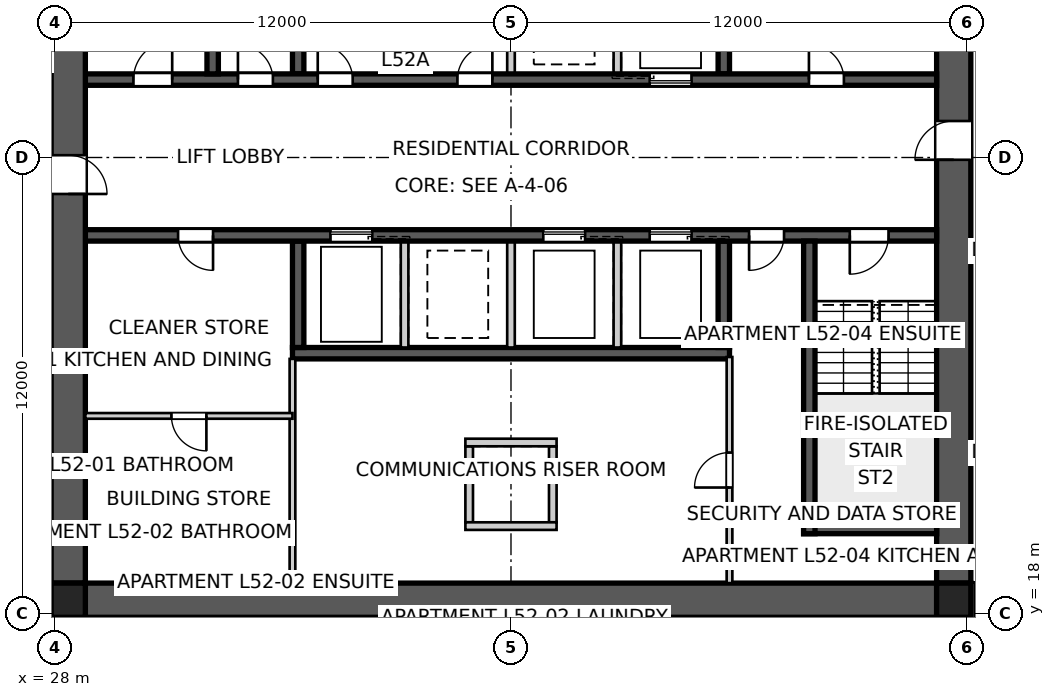
"""IFC4 building model, lengths in metres.
Left out: names, types, materials, properties, quantities, classifications, styles, units other than length and angle.
Written with IfcOpenShell. Run it as: python <this file> out.ifc"""

import sys

from ifc_helpers import new_model, si_unit, direction, frame, frame_2d, origin, origin_2d, place, context, subcontext, project, spatial, polyline, rectangle, outline, extrude, element, fill, save


model = new_model("IFC4")
c1 = context("Model", 3, precision=1e-05, world=origin(), true_north=direction((0.0, 1.0)))
c2 = subcontext(c1, "Body", "Model", "MODEL_VIEW")
j1 = project(units=[si_unit("LENGTHUNIT", "METRE"), si_unit("PLANEANGLEUNIT", "RADIAN")], contexts=[c1])
p1 = place(None, origin())
s1 = spatial("IfcSite", under=j1, at=p1, CompositionType="ELEMENT")
p2 = place(p1, origin())
s2 = spatial("IfcBuilding", under=s1, at=p2, CompositionType="ELEMENT")
p3 = place(p2, frame((0.0, 0.0, 189.6)))
s3 = spatial("IfcBuildingStorey", under=s2, at=p3, CompositionType="ELEMENT", Elevation=189.6)
p4 = place(p3, frame((51.2, 18.35, 0.0), z_axis=(0.0, 0.0, 1.0), x_axis=(-1.0, 0.0, 0.0)))
e1 = element("IfcWall", 1, at=p4, inside=s3, PredefinedType="SHEAR", context=c2, shape_type="SweptSolid", body=[
    extrude(outline(polyline([(0.0, -0.45), (22.4, -0.45), (22.4, -0.025), (22.85, -0.025), (22.85, 0.025), (22.4, 0.025), (22.4, 0.45), (0.0, 0.45), (0.0, 0.025), (-0.45, 0.025), (-0.45, -0.025), (0.0, -0.025), (0.0, -0.45)])), origin(), (0.0, 0.0, 1.0), 3.4),
])
p5 = place(p3, frame((51.65, 18.8, 0.0), z_axis=(0.0, 0.0, 1.0), x_axis=(0.0, 1.0, 0.0)))
e2 = element("IfcWall", 2, at=p5, inside=s3, PredefinedType="SHEAR", context=c2, shape_type="SweptSolid", body=[
    extrude(outline(polyline([(0.0, -0.45), (22.4, -0.45), (22.4, -0.025), (22.85, -0.025), (22.85, 0.025), (22.4, 0.025), (22.4, 0.45), (0.0, 0.45), (0.0, 0.025), (-0.45, 0.025), (-0.45, -0.025), (0.0, -0.025), (0.0, -0.45)])), origin(), (0.0, 0.0, 1.0), 3.4),
])
p6 = place(p5, frame((11.14, 0.0, 0.0)))
e3 = element("IfcOpeningElement", 3, at=p6, cuts=e2, PredefinedType="OPENING", context=c2, shape_type="SweptSolid", body=[
    extrude(rectangle(XDim=1.02, YDim=2.4, at=frame_2d((0.51, 1.2))), frame((0.0, 0.46, 0.0), z_axis=(0.0, -1.0, 0.0), x_axis=(1.0, 0.0, 0.0)), (0.0, 0.0, 1.0), 0.92),
])
p7 = place(p3, frame((28.35, 41.2, 0.0), z_axis=(0.0, 0.0, 1.0), x_axis=(0.0, -1.0, 0.0)))
e4 = element("IfcWall", 4, at=p7, inside=s3, PredefinedType="SHEAR", context=c2, shape_type="SweptSolid", body=[
    extrude(outline(polyline([(0.0, -0.45), (22.4, -0.45), (22.4, -0.025), (22.85, -0.025), (22.85, 0.025), (22.4, 0.025), (22.4, 0.45), (0.0, 0.45), (0.0, 0.025), (-0.45, 0.025), (-0.45, -0.025), (0.0, -0.025), (0.0, -0.45)])), origin(), (0.0, 0.0, 1.0), 3.4),
])
p8 = place(p7, frame((11.14, 0.0, 0.0)))
e5 = element("IfcOpeningElement", 5, at=p8, cuts=e4, PredefinedType="OPENING", context=c2, shape_type="SweptSolid", body=[
    extrude(rectangle(XDim=1.02, YDim=2.4, at=frame_2d((0.51, 1.2))), frame((0.0, 0.46, 0.0), z_axis=(0.0, -1.0, 0.0), x_axis=(1.0, 0.0, 0.0)), (0.0, 0.0, 1.0), 0.92),
])
p9 = place(p3, frame((28.8, 32.05, 0.0), z_axis=(0.0, 0.0, 1.0), x_axis=(1.0, 0.0, 0.0)))
e6 = element("IfcWall", 6, at=p9, inside=s3, PredefinedType="SHEAR", context=c2, shape_type="SweptSolid", body=[
    extrude(rectangle(XDim=22.4, YDim=0.3, at=frame_2d((11.2, 0.0))), origin(), (0.0, 0.0, 1.0), 3.4),
])
p10 = place(p9, frame((19.04, 0.0, 0.0)))
e7 = element("IfcOpeningElement", 7, at=p10, cuts=e6, PredefinedType="OPENING", context=c2, shape_type="SweptSolid", body=[
    extrude(rectangle(XDim=0.92, YDim=2.1, at=frame_2d((0.46, 1.05))), frame((0.0, 0.16, 0.0), z_axis=(0.0, -1.0, 0.0), x_axis=(1.0, 0.0, 0.0)), (0.0, 0.0, 1.0), 0.32),
])
p11 = place(p9, frame((1.265, 0.0, 0.0)))
e8 = element("IfcOpeningElement", 8, at=p11, cuts=e6, PredefinedType="OPENING", context=c2, shape_type="SweptSolid", body=[
    extrude(rectangle(XDim=1.02, YDim=2.1, at=frame_2d((0.51, 1.05))), frame((0.0, 0.16, 0.0), z_axis=(0.0, -1.0, 0.0), x_axis=(1.0, 0.0, 0.0)), (0.0, 0.0, 1.0), 0.32),
])
p12 = place(p9, frame((4.015, 0.0, 0.0)))
e9 = element("IfcOpeningElement", 9, at=p12, cuts=e6, PredefinedType="OPENING", context=c2, shape_type="SweptSolid", body=[
    extrude(rectangle(XDim=0.92, YDim=2.1, at=frame_2d((0.46, 1.05))), frame((0.0, 0.16, 0.0), z_axis=(0.0, -1.0, 0.0), x_axis=(1.0, 0.0, 0.0)), (0.0, 0.0, 1.0), 0.32),
])
p13 = place(p9, frame((6.115, 0.0, 0.0)))
e10 = element("IfcOpeningElement", 10, at=p13, cuts=e6, PredefinedType="OPENING", context=c2, shape_type="SweptSolid", body=[
    extrude(rectangle(XDim=0.92, YDim=2.1, at=frame_2d((0.46, 1.05))), frame((0.0, 0.16, 0.0), z_axis=(0.0, -1.0, 0.0), x_axis=(1.0, 0.0, 0.0)), (0.0, 0.0, 1.0), 0.32),
])
p14 = place(p9, frame((9.79, 0.0, 0.0)))
e11 = element("IfcOpeningElement", 11, at=p14, cuts=e6, PredefinedType="OPENING", context=c2, shape_type="SweptSolid", body=[
    extrude(rectangle(XDim=0.92, YDim=2.1, at=frame_2d((0.46, 1.05))), frame((0.0, 0.16, 0.0), z_axis=(0.0, -1.0, 0.0), x_axis=(1.0, 0.0, 0.0)), (0.0, 0.0, 1.0), 0.32),
])
p15 = place(p9, frame((14.85, 0.0, 0.0)))
e12 = element("IfcOpeningElement", 12, at=p15, cuts=e6, PredefinedType="OPENING", context=c2, shape_type="SweptSolid", body=[
    extrude(rectangle(XDim=1.1, YDim=2.1, at=frame_2d((0.55, 1.05))), frame((0.0, 0.16, 0.0), z_axis=(0.0, -1.0, 0.0), x_axis=(1.0, 0.0, 0.0)), (0.0, 0.0, 1.0), 0.32),
])
p16 = place(p3, frame((51.2, 27.95, 0.0), z_axis=(0.0, 0.0, 1.0), x_axis=(-1.0, 0.0, 0.0)))
e13 = element("IfcWall", 13, at=p16, inside=s3, PredefinedType="SHEAR", context=c2, shape_type="SweptSolid", body=[
    extrude(rectangle(XDim=22.4, YDim=0.3, at=frame_2d((11.2, 0.0))), origin(), (0.0, 0.0, 1.0), 3.4),
])
p17 = place(p16, frame((19.04, 0.0, 0.0)))
e14 = element("IfcOpeningElement", 14, at=p17, cuts=e13, PredefinedType="OPENING", context=c2, shape_type="SweptSolid", body=[
    extrude(rectangle(XDim=0.92, YDim=2.1, at=frame_2d((0.46, 1.05))), frame((0.0, 0.16, 0.0), z_axis=(0.0, -1.0, 0.0), x_axis=(1.0, 0.0, 0.0)), (0.0, 0.0, 1.0), 0.32),
])
p18 = place(p16, frame((1.265, 0.0, 0.0)))
e15 = element("IfcOpeningElement", 15, at=p18, cuts=e13, PredefinedType="OPENING", context=c2, shape_type="SweptSolid", body=[
    extrude(rectangle(XDim=1.02, YDim=2.1, at=frame_2d((0.51, 1.05))), frame((0.0, 0.16, 0.0), z_axis=(0.0, -1.0, 0.0), x_axis=(1.0, 0.0, 0.0)), (0.0, 0.0, 1.0), 0.32),
])
p19 = place(p16, frame((4.015, 0.0, 0.0)))
e16 = element("IfcOpeningElement", 16, at=p19, cuts=e13, PredefinedType="OPENING", context=c2, shape_type="SweptSolid", body=[
    extrude(rectangle(XDim=0.92, YDim=2.1, at=frame_2d((0.46, 1.05))), frame((0.0, 0.16, 0.0), z_axis=(0.0, -1.0, 0.0), x_axis=(1.0, 0.0, 0.0)), (0.0, 0.0, 1.0), 0.32),
])
p20 = place(p16, frame((6.45, 0.0, 0.0)))
e17 = element("IfcOpeningElement", 17, at=p20, cuts=e13, PredefinedType="OPENING", context=c2, shape_type="SweptSolid", body=[
    extrude(rectangle(XDim=1.1, YDim=2.1, at=frame_2d((0.55, 1.05))), frame((0.0, 0.16, 0.0), z_axis=(0.0, -1.0, 0.0), x_axis=(1.0, 0.0, 0.0)), (0.0, 0.0, 1.0), 0.32),
])
p21 = place(p16, frame((9.25, 0.0, 0.0)))
e18 = element("IfcOpeningElement", 18, at=p21, cuts=e13, PredefinedType="OPENING", context=c2, shape_type="SweptSolid", body=[
    extrude(rectangle(XDim=1.1, YDim=2.1, at=frame_2d((0.55, 1.05))), frame((0.0, 0.16, 0.0), z_axis=(0.0, -1.0, 0.0), x_axis=(1.0, 0.0, 0.0)), (0.0, 0.0, 1.0), 0.32),
])
p22 = place(p16, frame((14.85, 0.0, 0.0)))
e19 = element("IfcOpeningElement", 19, at=p22, cuts=e13, PredefinedType="OPENING", context=c2, shape_type="SweptSolid", body=[
    extrude(rectangle(XDim=1.1, YDim=2.1, at=frame_2d((0.55, 1.05))), frame((0.0, 0.16, 0.0), z_axis=(0.0, -1.0, 0.0), x_axis=(1.0, 0.0, 0.0)), (0.0, 0.0, 1.0), 0.32),
])
p23 = place(p3, frame((45.75, 24.85, 0.0), z_axis=(0.0, 0.0, 1.0), x_axis=(-1.0, 0.0, 0.0)))
e20 = element("IfcWall", 20, at=p23, inside=s3, PredefinedType="SHEAR", context=c2, shape_type="SweptSolid", body=[
    extrude(rectangle(XDim=11.5, YDim=0.3, at=frame_2d((5.75, 0.0))), origin(), (0.0, 0.0, 1.0), 3.4),
])
for number, where, z_axis, x_axis in (
    (21, (34.4, 32.2, 0.0), (0.0, 0.0, 1.0), (0.0, 1.0, 0.0)),
    (22, (45.6, 27.8, 0.0), (0.0, 0.0, 1.0), (0.0, -1.0, 0.0)),
):
    element("IfcWall", number, at=place(p3, frame(where, z_axis=z_axis, x_axis=x_axis)), inside=s3, PredefinedType="SHEAR", context=c2, shape_type="SweptSolid", body=[
        extrude(rectangle(XDim=2.8, YDim=0.3, at=frame_2d((1.4, 0.0))), origin(), (0.0, 0.0, 1.0), 3.4),
    ])
for number, where, z_axis, x_axis in (
    (23, (42.8, 27.8, 0.0), (0.0, 0.0, 1.0), (0.0, -1.0, 0.0)),
    (24, (40.0, 32.2, 0.0), (0.0, 0.0, 1.0), (0.0, 1.0, 0.0)),
    (25, (40.0, 27.8, 0.0), (0.0, 0.0, 1.0), (0.0, -1.0, 0.0)),
    (26, (42.8, 32.2, 0.0), (0.0, 0.0, 1.0), (0.0, 1.0, 0.0)),
    (27, (37.2, 27.8, 0.0), (0.0, 0.0, 1.0), (0.0, -1.0, 0.0)),
):
    element("IfcWall", number, at=place(p3, frame(where, z_axis=z_axis, x_axis=x_axis)), inside=s3, PredefinedType="SOLIDWALL", context=c2, shape_type="SweptSolid", body=[
        extrude(rectangle(XDim=2.8, YDim=0.2, at=frame_2d((1.4, 0.0))), origin(), (0.0, 0.0, 1.0), 3.4),
    ])
for number, where, z_axis, x_axis in (
    (28, (45.6, 32.2, 0.0), (0.0, 0.0, 1.0), (0.0, 1.0, 0.0)),
    (29, (34.4, 27.8, 0.0), (0.0, 0.0, 1.0), (0.0, -1.0, 0.0)),
):
    element("IfcWall", number, at=place(p3, frame(where, z_axis=z_axis, x_axis=x_axis)), inside=s3, PredefinedType="SHEAR", context=c2, shape_type="SweptSolid", body=[
        extrude(rectangle(XDim=2.8, YDim=0.3, at=frame_2d((1.4, 0.0))), origin(), (0.0, 0.0, 1.0), 3.4),
    ])
for number, where, z_axis, x_axis in (
    (30, (32.15, 32.2, 0.0), (0.0, 0.0, 1.0), (0.0, 1.0, 0.0)),
    (31, (47.85, 27.8, 0.0), (0.0, 0.0, 1.0), (0.0, -1.0, 0.0)),
):
    element("IfcWall", number, at=place(p3, frame(where, z_axis=z_axis, x_axis=x_axis)), inside=s3, PredefinedType="SHEAR", context=c2, shape_type="SweptSolid", body=[
        extrude(rectangle(XDim=7.7, YDim=0.3, at=frame_2d((3.85, 0.0))), origin(), (0.0, 0.0, 1.0), 3.4),
    ])
p24 = place(p3, frame((51.2, 20.25, 0.0), z_axis=(0.0, 0.0, 1.0), x_axis=(-1.0, 0.0, 0.0)))
e32 = element("IfcWall", 32, at=p24, inside=s3, PredefinedType="SHEAR", context=c2, shape_type="SweptSolid", body=[
    extrude(rectangle(XDim=3.5, YDim=0.3, at=frame_2d((1.75, 0.0))), origin(), (0.0, 0.0, 1.0), 3.4),
])
for number, where, z_axis, x_axis in (
    (33, (38.9, 22.4, 0.0), (0.0, 0.0, 1.0), (0.0, -1.0, 0.0)),
    (34, (41.1, 22.4, 0.0), (0.0, 0.0, 1.0), (0.0, -1.0, 0.0)),
):
    element("IfcWall", number, at=place(p3, frame(where, z_axis=z_axis, x_axis=x_axis)), inside=s3, PredefinedType="SOLIDWALL", context=c2, shape_type="SweptSolid", body=[
        extrude(rectangle(XDim=2.0, YDim=0.2, at=frame_2d((1.0, 0.0))), origin(), (0.0, 0.0, 1.0), 3.4),
    ])
for number, where, z_axis, x_axis in (
    (35, (38.8, 22.5, 0.0), (0.0, 0.0, 1.0), (1.0, 0.0, 0.0)),
    (36, (38.8, 20.3, 0.0), (0.0, 0.0, 1.0), (1.0, 0.0, 0.0)),
):
    element("IfcWall", number, at=place(p3, frame(where, z_axis=z_axis, x_axis=x_axis)), inside=s3, PredefinedType="SOLIDWALL", context=c2, shape_type="SweptSolid", body=[
        extrude(rectangle(XDim=2.4, YDim=0.2, at=frame_2d((1.2, 0.0))), origin(), (0.0, 0.0, 1.0), 3.4),
    ])
for number, where, z_axis, x_axis in (
    (37, (28.35, 18.35, 0.0), (0.0, 0.0, 1.0), (1.0, 0.0, 0.0)),
    (38, (51.65, 18.35, 0.0), (0.0, 0.0, 1.0), (1.0, 0.0, 0.0)),
):
    element("IfcColumn", number, at=place(p3, frame(where, z_axis=z_axis, x_axis=x_axis)), inside=s3, PredefinedType="COLUMN", context=c2, shape_type="SweptSolid", body=[
        extrude(rectangle(XDim=0.9, YDim=0.9, at=origin_2d()), origin(), (0.0, 0.0, 1.0), 3.4),
    ])
p25 = place(p3, frame((45.75, 18.8, 0.0), z_axis=(0.0, 0.0, 1.0), x_axis=(0.0, 1.0, 0.0)))
e39 = element("IfcWall", 39, at=p25, inside=s3, PredefinedType="SOLIDWALL", context=c2, shape_type="SweptSolid", body=[
    extrude(rectangle(XDim=5.95, YDim=0.15, at=frame_2d((2.975, 0.0))), origin(), (0.0, 0.0, 1.0), 3.25),
])
p26 = place(p25, frame((2.515, 0.0, 0.0)))
e40 = element("IfcOpeningElement", 40, at=p26, cuts=e39, PredefinedType="OPENING", context=c2, shape_type="SweptSolid", body=[
    extrude(rectangle(XDim=0.92, YDim=2.1, at=frame_2d((0.46, 1.05))), frame((0.0, 0.085, 0.0), z_axis=(0.0, -1.0, 0.0), x_axis=(1.0, 0.0, 0.0)), (0.0, 0.0, 1.0), 0.17),
])
p27 = place(p3, frame((34.25, 18.8, 0.0), z_axis=(0.0, 0.0, 1.0), x_axis=(0.0, 1.0, 0.0)))
e41 = element("IfcWall", 41, at=p27, inside=s3, PredefinedType="SOLIDWALL", context=c2, shape_type="SweptSolid", body=[
    extrude(rectangle(XDim=5.9, YDim=0.15, at=frame_2d((2.95, 0.0))), origin(), (0.0, 0.0, 1.0), 3.25),
])
p28 = place(p3, frame((34.25, 23.2, 0.0), z_axis=(0.0, 0.0, 1.0), x_axis=(-1.0, 0.0, 0.0)))
e42 = element("IfcWall", 42, at=p28, inside=s3, PredefinedType="SOLIDWALL", context=c2, shape_type="SweptSolid", body=[
    extrude(rectangle(XDim=5.45, YDim=0.15, at=frame_2d((2.725, 0.0))), origin(), (0.0, 0.0, 1.0), 3.25),
])
p29 = place(p28, frame((2.265, 0.0, 0.0)))
e43 = element("IfcOpeningElement", 43, at=p29, cuts=e42, PredefinedType="OPENING", context=c2, shape_type="SweptSolid", body=[
    extrude(rectangle(XDim=0.92, YDim=2.1, at=frame_2d((0.46, 1.05))), frame((0.0, 0.085, 0.0), z_axis=(0.0, -1.0, 0.0), x_axis=(1.0, 0.0, 0.0)), (0.0, 0.0, 1.0), 0.17),
])
p30 = place(p3, frame((27.9, 17.95, 0.0), z_axis=(0.0, 0.0, 1.0), x_axis=(0.0, -1.0, 0.0)))
e44 = element("IfcWall", 44, at=p30, inside=s3, PredefinedType="PARTITIONING", context=c2, shape_type="SweptSolid", body=[
    extrude(rectangle(XDim=2.3, YDim=0.2, at=frame_2d((1.15, 0.0))), origin(), (0.0, 0.0, 1.0), 3.25),
])
p31 = place(p3, frame((52.1, 15.65, 0.0), z_axis=(0.0, 0.0, 1.0), x_axis=(0.0, 1.0, 0.0)))
e45 = element("IfcWall", 45, at=p31, inside=s3, PredefinedType="PARTITIONING", context=c2, shape_type="SweptSolid", body=[
    extrude(rectangle(XDim=3.17, YDim=0.2, at=frame_2d((1.585, 0.0))), origin(), (0.0, 0.0, 1.0), 3.25),
])
p32 = place(p10, origin())
e46 = element("IfcDoor", 46, at=p32, inside=s3, OperationType="SINGLE_SWING_LEFT", PredefinedType="DOOR", context=c2, shape_type="SweptSolid", body=[
    extrude(rectangle(XDim=0.92, YDim=2.1, at=frame_2d((0.46, 1.05))), frame((0.0, 0.025, 0.0), z_axis=(0.0, -1.0, 0.0), x_axis=(1.0, 0.0, 0.0)), (0.0, 0.0, 1.0), 0.05),
])
fill(e7, e46)
p33 = place(p17, origin())
e47 = element("IfcDoor", 47, at=p33, inside=s3, OperationType="SINGLE_SWING_LEFT", PredefinedType="DOOR", context=c2, shape_type="SweptSolid", body=[
    extrude(rectangle(XDim=0.92, YDim=2.1, at=frame_2d((0.46, 1.05))), frame((0.0, 0.025, 0.0), z_axis=(0.0, -1.0, 0.0), x_axis=(1.0, 0.0, 0.0)), (0.0, 0.0, 1.0), 0.05),
])
fill(e14, e47)
p34 = place(p18, origin())
e48 = element("IfcDoor", 48, at=p34, inside=s3, OperationType="SINGLE_SWING_RIGHT", PredefinedType="DOOR", context=c2, shape_type="SweptSolid", body=[
    extrude(rectangle(XDim=1.02, YDim=2.1, at=frame_2d((0.51, 1.05))), frame((0.0, 0.025, 0.0), z_axis=(0.0, -1.0, 0.0), x_axis=(1.0, 0.0, 0.0)), (0.0, 0.0, 1.0), 0.05),
])
fill(e15, e48)
p35 = place(p11, origin())
e49 = element("IfcDoor", 49, at=p35, inside=s3, OperationType="SINGLE_SWING_RIGHT", PredefinedType="DOOR", context=c2, shape_type="SweptSolid", body=[
    extrude(rectangle(XDim=1.02, YDim=2.1, at=frame_2d((0.51, 1.05))), frame((0.0, 0.025, 0.0), z_axis=(0.0, -1.0, 0.0), x_axis=(1.0, 0.0, 0.0)), (0.0, 0.0, 1.0), 0.05),
])
fill(e8, e49)
p36 = place(p12, origin())
e50 = element("IfcDoor", 50, at=p36, inside=s3, OperationType="SINGLE_SWING_LEFT", PredefinedType="DOOR", context=c2, shape_type="SweptSolid", body=[
    extrude(rectangle(XDim=0.92, YDim=2.1, at=frame_2d((0.46, 1.05))), frame((0.0, 0.025, 0.0), z_axis=(0.0, -1.0, 0.0), x_axis=(1.0, 0.0, 0.0)), (0.0, 0.0, 1.0), 0.05),
])
fill(e9, e50)
p37 = place(p19, origin())
e51 = element("IfcDoor", 51, at=p37, inside=s3, OperationType="SINGLE_SWING_RIGHT", PredefinedType="DOOR", context=c2, shape_type="SweptSolid", body=[
    extrude(rectangle(XDim=0.92, YDim=2.1, at=frame_2d((0.46, 1.05))), frame((0.0, 0.025, 0.0), z_axis=(0.0, -1.0, 0.0), x_axis=(1.0, 0.0, 0.0)), (0.0, 0.0, 1.0), 0.05),
])
fill(e16, e51)
p38 = place(p29, origin())
e52 = element("IfcDoor", 52, at=p38, inside=s3, OperationType="SINGLE_SWING_LEFT", PredefinedType="DOOR", context=c2, shape_type="SweptSolid", body=[
    extrude(rectangle(XDim=0.92, YDim=2.1, at=frame_2d((0.46, 1.05))), frame((0.0, 0.025, 0.0), z_axis=(0.0, -1.0, 0.0), x_axis=(1.0, 0.0, 0.0)), (0.0, 0.0, 1.0), 0.05),
])
fill(e43, e52)
p39 = place(p26, origin())
e53 = element("IfcDoor", 53, at=p39, inside=s3, OperationType="SINGLE_SWING_LEFT", PredefinedType="DOOR", context=c2, shape_type="SweptSolid", body=[
    extrude(rectangle(XDim=0.92, YDim=2.1, at=frame_2d((0.46, 1.05))), frame((0.0, 0.025, 0.0), z_axis=(0.0, -1.0, 0.0), x_axis=(1.0, 0.0, 0.0)), (0.0, 0.0, 1.0), 0.05),
])
fill(e40, e53)
p40 = place(p13, origin())
e54 = element("IfcDoor", 54, at=p40, inside=s3, OperationType="SINGLE_SWING_LEFT", PredefinedType="DOOR", context=c2, shape_type="SweptSolid", body=[
    extrude(rectangle(XDim=0.92, YDim=2.1, at=frame_2d((0.46, 1.05))), frame((0.0, 0.025, 0.0), z_axis=(0.0, -1.0, 0.0), x_axis=(1.0, 0.0, 0.0)), (0.0, 0.0, 1.0), 0.05),
])
fill(e10, e54)
p41 = place(p14, origin())
e55 = element("IfcDoor", 55, at=p41, inside=s3, OperationType="SINGLE_SWING_RIGHT", PredefinedType="DOOR", context=c2, shape_type="SweptSolid", body=[
    extrude(rectangle(XDim=0.92, YDim=2.1, at=frame_2d((0.46, 1.05))), frame((0.0, 0.025, 0.0), z_axis=(0.0, -1.0, 0.0), x_axis=(1.0, 0.0, 0.0)), (0.0, 0.0, 1.0), 0.05),
])
fill(e11, e55)
p42 = place(p6, origin())
e56 = element("IfcDoor", 56, at=p42, inside=s3, OperationType="SINGLE_SWING_LEFT", PredefinedType="DOOR", context=c2, shape_type="SweptSolid", body=[
    extrude(rectangle(XDim=1.02, YDim=2.4, at=frame_2d((0.51, 1.2))), frame((0.0, 0.025, 0.0), z_axis=(0.0, -1.0, 0.0), x_axis=(1.0, 0.0, 0.0)), (0.0, 0.0, 1.0), 0.05),
])
fill(e3, e56)
p43 = place(p8, origin())
e57 = element("IfcDoor", 57, at=p43, inside=s3, OperationType="SINGLE_SWING_RIGHT", PredefinedType="DOOR", context=c2, shape_type="SweptSolid", body=[
    extrude(rectangle(XDim=1.02, YDim=2.4, at=frame_2d((0.51, 1.2))), frame((0.0, 0.025, 0.0), z_axis=(0.0, -1.0, 0.0), x_axis=(1.0, 0.0, 0.0)), (0.0, 0.0, 1.0), 0.05),
])
fill(e5, e57)
p44 = place(p20, origin())
e58 = element("IfcDoor", 58, at=p44, inside=s3, OperationType="SLIDING_TO_LEFT", PredefinedType="DOOR", context=c2, shape_type="SweptSolid", body=[
    extrude(rectangle(XDim=1.1, YDim=2.1, at=frame_2d((0.55, 1.05))), frame((0.0, 0.025, 0.0), z_axis=(0.0, -1.0, 0.0), x_axis=(1.0, 0.0, 0.0)), (0.0, 0.0, 1.0), 0.05),
])
fill(e17, e58)
p45 = place(p21, origin())
e59 = element("IfcDoor", 59, at=p45, inside=s3, OperationType="SLIDING_TO_LEFT", PredefinedType="DOOR", context=c2, shape_type="SweptSolid", body=[
    extrude(rectangle(XDim=1.1, YDim=2.1, at=frame_2d((0.55, 1.05))), frame((0.0, 0.025, 0.0), z_axis=(0.0, -1.0, 0.0), x_axis=(1.0, 0.0, 0.0)), (0.0, 0.0, 1.0), 0.05),
])
fill(e18, e59)
p46 = place(p15, origin())
e60 = element("IfcDoor", 60, at=p46, inside=s3, OperationType="SLIDING_TO_LEFT", PredefinedType="DOOR", context=c2, shape_type="SweptSolid", body=[
    extrude(rectangle(XDim=1.1, YDim=2.1, at=frame_2d((0.55, 1.05))), frame((0.0, 0.025, 0.0), z_axis=(0.0, -1.0, 0.0), x_axis=(1.0, 0.0, 0.0)), (0.0, 0.0, 1.0), 0.05),
])
fill(e12, e60)
p47 = place(p22, origin())
e61 = element("IfcDoor", 61, at=p47, inside=s3, OperationType="SLIDING_TO_LEFT", PredefinedType="DOOR", context=c2, shape_type="SweptSolid", body=[
    extrude(rectangle(XDim=1.1, YDim=2.1, at=frame_2d((0.55, 1.05))), frame((0.0, 0.025, 0.0), z_axis=(0.0, -1.0, 0.0), x_axis=(1.0, 0.0, 0.0)), (0.0, 0.0, 1.0), 0.05),
])
fill(e19, e61)
save(model, sys.argv[1])
